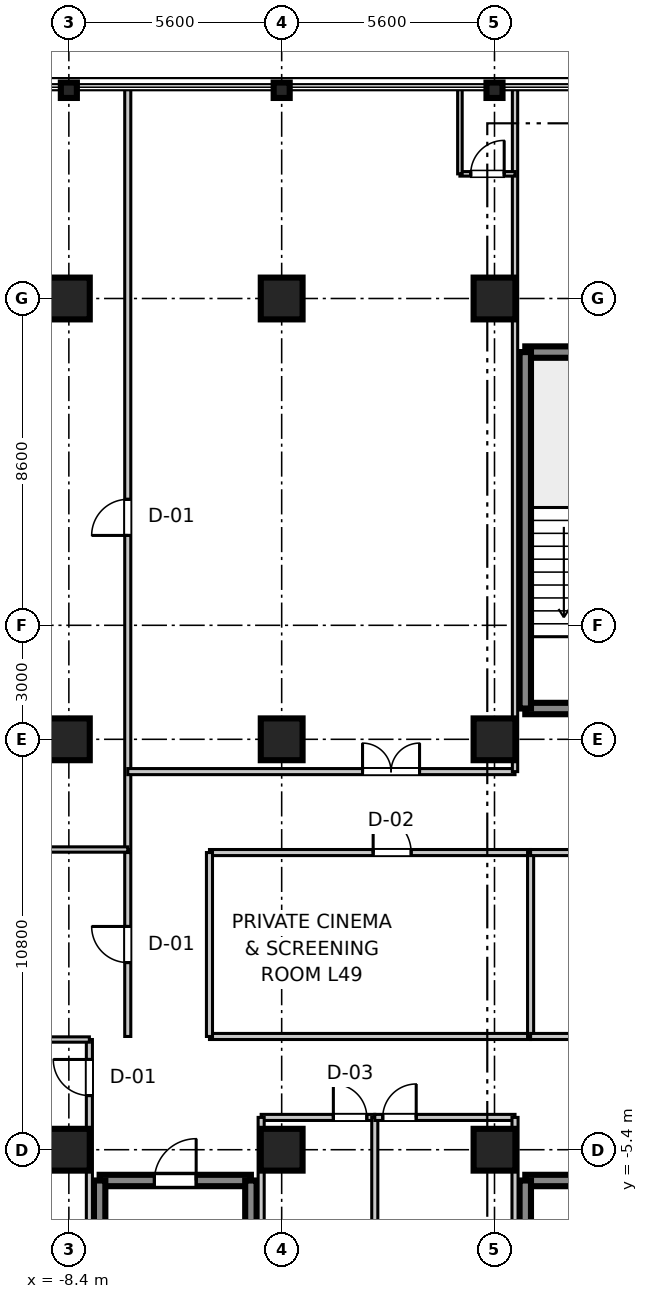
"""IFC4 building model, lengths in metres.
Left out: names, types, materials, properties, quantities, classifications, styles, units other than length and angle.
Written with IfcOpenShell. Run it as: python <this file> out.ifc"""

import sys

from ifc_helpers import new_model, si_unit, direction, frame, frame_2d, origin, origin_2d, place, context, subcontext, project, spatial, rectangle, i_section, extrude, source, transform, mapped, element, fill, save


model = new_model("IFC4")
c1 = context("Model", 3, precision=1e-05, world=origin(), true_north=direction((0.0, 1.0)))
c2 = subcontext(c1, "Body", "Model", "MODEL_VIEW")
j1 = project(units=[si_unit("LENGTHUNIT", "METRE"), si_unit("PLANEANGLEUNIT", "RADIAN")], contexts=[c1])
p1 = place(None, origin())
s1 = spatial("IfcSite", under=j1, at=p1, CompositionType="ELEMENT")
p2 = place(p1, origin())
s2 = spatial("IfcBuilding", under=s1, at=p2, CompositionType="ELEMENT")
p3 = place(p2, frame((0.0, 0.0, 192.8)))
s3 = spatial("IfcBuildingStorey", under=s2, at=p3, CompositionType="ELEMENT", Elevation=192.8)
m1 = source(origin(), c2, "Body", "SweptSolid", [
    extrude(rectangle(XDim=1.1, YDim=1.1, at=origin_2d()), origin(), (0.0, 0.0, 1.0), 3.605),
])
for number, where, z_axis, x_axis in (
    (1, (-8.4, -5.4, 0.0), (0.0, 0.0, 1.0), (1.0, 0.0, 0.0)),
    (2, (-8.4, 5.4, 0.0), (0.0, 0.0, 1.0), (1.0, 0.0, 0.0)),
    (3, (-8.4, 17.0, 0.0), (0.0, 0.0, 1.0), (1.0, 0.0, 0.0)),
    (4, (-2.8, -5.4, 0.0), (0.0, 0.0, 1.0), (1.0, 0.0, 0.0)),
    (5, (-2.8, 5.4, 0.0), (0.0, 0.0, 1.0), (1.0, 0.0, 0.0)),
    (6, (-2.8, 17.0, 0.0), (0.0, 0.0, 1.0), (1.0, 0.0, 0.0)),
    (7, (2.8, -5.4, 0.0), (0.0, 0.0, 1.0), (1.0, 0.0, 0.0)),
    (8, (2.8, 5.4, 0.0), (0.0, 0.0, 1.0), (1.0, 0.0, 0.0)),
    (9, (2.8, 17.0, 0.0), (0.0, 0.0, 1.0), (1.0, 0.0, 0.0)),
):
    element("IfcColumn", number, at=place(p3, frame(where, z_axis=z_axis, x_axis=x_axis)), inside=s3, PredefinedType="COLUMN", context=c2, shape_type="MappedRepresentation", body=[
        mapped(m1, transform((0.0, 0.0, 0.0), scale=1.0)),
    ])
m2 = source(origin(), c2, "Body", "SweptSolid", [
    extrude(i_section(OverallWidth=0.406, OverallDepth=0.422, WebThickness=0.019, FlangeThickness=0.03, at=origin_2d()), origin(), (0.0, 0.0, 1.0), 3.605),
])
for number, where, z_axis, x_axis in (
    (10, (-8.4, 22.48, 0.0), (0.0, 0.0, 1.0), (0.0, 1.0, 0.0)),
    (11, (-2.8, 22.48, 0.0), (0.0, 0.0, 1.0), (0.0, 1.0, 0.0)),
    (12, (2.8, 22.48, 0.0), (0.0, 0.0, 1.0), (0.0, 1.0, 0.0)),
):
    element("IfcColumn", number, at=place(p3, frame(where, z_axis=z_axis, x_axis=x_axis)), inside=s3, PredefinedType="COLUMN", context=c2, shape_type="MappedRepresentation", body=[
        mapped(m2, transform((0.0, 0.0, 0.0), scale=1.0)),
    ])
m3 = source(origin(), c2, "Body", "SweptSolid", [
    extrude(rectangle(XDim=3.98, YDim=0.3, at=frame_2d((1.99, 0.0))), origin(), (0.0, 0.0, 1.0), 3.39),
])
for number, where, z_axis, x_axis in (
    (13, (3.61, 6.21, 0.0), (0.0, 0.0, 1.0), (1.0, 0.0, 0.0)),
    (14, (3.61, 15.59, 0.0), (0.0, 0.0, 1.0), (1.0, 0.0, 0.0)),
):
    element("IfcWall", number, at=place(p3, frame(where, z_axis=z_axis, x_axis=x_axis)), inside=s3, PredefinedType="SHEAR", context=c2, shape_type="MappedRepresentation", body=[
        mapped(m3, transform((0.0, 0.0, 0.0), scale=1.0)),
    ])
m4 = source(origin(), c2, "Body", "SweptSolid", [
    extrude(rectangle(XDim=9.38, YDim=0.3, at=frame_2d((4.69, 0.0))), origin(), (0.0, 0.0, 1.0), 3.39),
])
p4 = place(p3, frame((3.61, 6.21, 0.0), z_axis=(0.0, 0.0, 1.0), x_axis=(0.0, 1.0, 0.0)))
e15 = element("IfcWall", 15, at=p4, inside=s3, PredefinedType="SHEAR", context=c2, shape_type="MappedRepresentation", body=[
    mapped(m4, transform((0.0, 0.0, 0.0), scale=1.0)),
])
p5 = place(p3, frame((3.61, -6.21, 0.0), z_axis=(0.0, 0.0, 1.0), x_axis=(1.0, 0.0, 0.0)))
e16 = element("IfcWall", 16, at=p5, inside=s3, PredefinedType="SHEAR", context=c2, shape_type="MappedRepresentation", body=[
    mapped(m3, transform((0.0, 0.0, 0.0), scale=1.0)),
])
p6 = place(p3, frame((3.61, -15.59, 0.0), z_axis=(0.0, 0.0, 1.0), x_axis=(0.0, 1.0, 0.0)))
e17 = element("IfcWall", 17, at=p6, inside=s3, PredefinedType="SHEAR", context=c2, shape_type="MappedRepresentation", body=[
    mapped(m4, transform((0.0, 0.0, 0.0), scale=1.0)),
])
p7 = place(p3, frame((-7.59, -6.21, 0.0), z_axis=(0.0, 0.0, 1.0), x_axis=(1.0, 0.0, 0.0)))
e18 = element("IfcWall", 18, at=p7, inside=s3, PredefinedType="SHEAR", context=c2, shape_type="MappedRepresentation", body=[
    mapped(m3, transform((0.0, 0.0, 0.0), scale=1.0)),
])
p8 = place(p7, frame((1.44, 0.0, 0.0)))
e19 = element("IfcOpeningElement", 19, at=p8, cuts=e18, PredefinedType="OPENING", context=c2, shape_type="SweptSolid", body=[
    extrude(rectangle(XDim=1.1, YDim=2.15, at=frame_2d((0.55, 1.075))), frame((0.0, 0.16, 0.0), z_axis=(0.0, -1.0, 0.0), x_axis=(1.0, 0.0, 0.0)), (0.0, 0.0, 1.0), 0.32),
])
for number, where, z_axis, x_axis in (
    (20, (-7.59, -15.59, 0.0), (0.0, 0.0, 1.0), (0.0, 1.0, 0.0)),
    (21, (-3.61, -15.59, 0.0), (0.0, 0.0, 1.0), (0.0, 1.0, 0.0)),
):
    element("IfcWall", number, at=place(p3, frame(where, z_axis=z_axis, x_axis=x_axis)), inside=s3, PredefinedType="SHEAR", context=c2, shape_type="MappedRepresentation", body=[
        mapped(m4, transform((0.0, 0.0, 0.0), scale=1.0)),
    ])
m5 = source(origin(), c2, "Body", "SweptSolid", [
    extrude(rectangle(XDim=20.0, YDim=0.16, at=frame_2d((10.0, 0.0))), origin(), (0.0, 0.0, 1.0), 2.73),
])
p9 = place(p3, frame((-6.85, 2.5, 0.0), z_axis=(0.0, 0.0, 1.0), x_axis=(0.0, 1.0, 0.0)))
e22 = element("IfcWall", 22, at=p9, inside=s3, PredefinedType="PARTITIONING", context=c2, shape_type="MappedRepresentation", body=[
    mapped(m5, transform((0.0, 0.0, 0.0), scale=1.0)),
])
p10 = place(p9, frame((8.265, 0.0, 0.0)))
e23 = element("IfcOpeningElement", 23, at=p10, cuts=e22, PredefinedType="OPENING", context=c2, shape_type="SweptSolid", body=[
    extrude(rectangle(XDim=0.95, YDim=2.1, at=frame_2d((0.475, 1.05))), frame((0.0, 0.09, 0.0), z_axis=(0.0, -1.0, 0.0), x_axis=(1.0, 0.0, 0.0)), (0.0, 0.0, 1.0), 0.18),
])
m6 = source(origin(), c2, "Body", "SweptSolid", [
    extrude(rectangle(XDim=12.91, YDim=0.14, at=frame_2d((6.455, 0.0))), origin(), (0.0, 0.0, 1.0), 2.73),
])
p11 = place(p3, frame((-19.76, 2.5, 0.0), z_axis=(0.0, 0.0, 1.0), x_axis=(1.0, 0.0, 0.0)))
e24 = element("IfcWall", 24, at=p11, inside=s3, PredefinedType="PARTITIONING", context=c2, shape_type="MappedRepresentation", body=[
    mapped(m6, transform((0.0, 0.0, 0.0), scale=1.0)),
])
m7 = source(origin(), c2, "Body", "SweptSolid", [
    extrude(rectangle(XDim=10.19, YDim=0.16, at=frame_2d((5.095, 0.0))), origin(), (0.0, 0.0, 1.0), 2.73),
])
p12 = place(p3, frame((-6.85, 4.55, 0.0), z_axis=(0.0, 0.0, 1.0), x_axis=(1.0, 0.0, 0.0)))
e25 = element("IfcWall", 25, at=p12, inside=s3, PredefinedType="PARTITIONING", context=c2, shape_type="MappedRepresentation", body=[
    mapped(m7, transform((0.0, 0.0, 0.0), scale=1.0)),
])
p13 = place(p12, frame((6.178, 0.0, 0.0)))
e26 = element("IfcOpeningElement", 26, at=p13, cuts=e25, PredefinedType="OPENING", context=c2, shape_type="SweptSolid", body=[
    extrude(rectangle(XDim=1.5, YDim=2.15, at=frame_2d((0.75, 1.075))), frame((0.0, 0.09, 0.0), z_axis=(0.0, -1.0, 0.0), x_axis=(1.0, 0.0, 0.0)), (0.0, 0.0, 1.0), 0.18),
])
m8 = source(origin(), c2, "Body", "SweptSolid", [
    extrude(rectangle(XDim=17.95, YDim=0.14, at=frame_2d((8.975, 0.0))), origin(), (0.0, 0.0, 1.0), 2.73),
])
p14 = place(p3, frame((3.34, 4.55, 0.0), z_axis=(0.0, 0.0, 1.0), x_axis=(0.0, 1.0, 0.0)))
e27 = element("IfcWall", 27, at=p14, inside=s3, PredefinedType="PARTITIONING", context=c2, shape_type="MappedRepresentation", body=[
    mapped(m8, transform((0.0, 0.0, 0.0), scale=1.0)),
])
m9 = source(origin(), c2, "Body", "SweptSolid", [
    extrude(rectangle(XDim=1.45, YDim=0.12, at=frame_2d((0.725, 0.0))), origin(), (0.0, 0.0, 1.0), 2.73),
])
p15 = place(p3, frame((1.89, 20.28, 0.0), z_axis=(0.0, 0.0, 1.0), x_axis=(1.0, 0.0, 0.0)))
e28 = element("IfcWall", 28, at=p15, inside=s3, PredefinedType="PARTITIONING", context=c2, shape_type="MappedRepresentation", body=[
    mapped(m9, transform((0.0, 0.0, 0.0), scale=1.0)),
])
p16 = place(p15, frame((0.285, 0.0, 0.0)))
e29 = element("IfcOpeningElement", 29, at=p16, cuts=e28, PredefinedType="OPENING", context=c2, shape_type="SweptSolid", body=[
    extrude(rectangle(XDim=0.88, YDim=2.1, at=frame_2d((0.44, 1.05))), frame((0.0, 0.07, 0.0), z_axis=(0.0, -1.0, 0.0), x_axis=(1.0, 0.0, 0.0)), (0.0, 0.0, 1.0), 0.14),
])
m10 = source(origin(), c2, "Body", "SweptSolid", [
    extrude(rectangle(XDim=2.22, YDim=0.12, at=frame_2d((1.11, 0.0))), origin(), (0.0, 0.0, 1.0), 2.73),
])
p17 = place(p3, frame((1.89, 20.28, 0.0), z_axis=(0.0, 0.0, 1.0), x_axis=(0.0, 1.0, 0.0)))
e30 = element("IfcWall", 30, at=p17, inside=s3, PredefinedType="PARTITIONING", context=c2, shape_type="MappedRepresentation", body=[
    mapped(m10, transform((0.0, 0.0, 0.0), scale=1.0)),
])
p18 = place(p3, frame((-7.86, -22.5, 0.0), z_axis=(0.0, 0.0, 1.0), x_axis=(0.0, 1.0, 0.0)))
e31 = element("IfcWall", 31, at=p18, inside=s3, PredefinedType="PARTITIONING", context=c2, shape_type="MappedRepresentation", body=[
    mapped(m5, transform((0.0, 0.0, 0.0), scale=1.0)),
])
p19 = place(p18, frame((18.525, 0.0, 0.0)))
e32 = element("IfcOpeningElement", 32, at=p19, cuts=e31, PredefinedType="OPENING", context=c2, shape_type="SweptSolid", body=[
    extrude(rectangle(XDim=0.95, YDim=2.1, at=frame_2d((0.475, 1.05))), frame((0.0, 0.09, 0.0), z_axis=(0.0, -1.0, 0.0), x_axis=(1.0, 0.0, 0.0)), (0.0, 0.0, 1.0), 0.18),
])
m11 = source(origin(), c2, "Body", "SweptSolid", [
    extrude(rectangle(XDim=11.9, YDim=0.14, at=frame_2d((5.95, 0.0))), origin(), (0.0, 0.0, 1.0), 2.73),
])
p20 = place(p3, frame((-19.76, -2.5, 0.0), z_axis=(0.0, 0.0, 1.0), x_axis=(1.0, 0.0, 0.0)))
e33 = element("IfcWall", 33, at=p20, inside=s3, PredefinedType="PARTITIONING", context=c2, shape_type="MappedRepresentation", body=[
    mapped(m11, transform((0.0, 0.0, 0.0), scale=1.0)),
])
m12 = source(origin(), c2, "Body", "SweptSolid", [
    extrude(rectangle(XDim=2.99, YDim=0.16, at=frame_2d((1.495, 0.0))), origin(), (0.0, 0.0, 1.0), 2.73),
])
p21 = place(p3, frame((-3.34, -4.55, 0.0), z_axis=(0.0, 0.0, 1.0), x_axis=(1.0, 0.0, 0.0)))
e34 = element("IfcWall", 34, at=p21, inside=s3, PredefinedType="PARTITIONING", context=c2, shape_type="MappedRepresentation", body=[
    mapped(m12, transform((0.0, 0.0, 0.0), scale=1.0)),
])
p22 = place(p21, frame((1.9, 0.0, 0.0)))
e35 = element("IfcOpeningElement", 35, at=p22, cuts=e34, PredefinedType="OPENING", context=c2, shape_type="SweptSolid", body=[
    extrude(rectangle(XDim=0.88, YDim=2.1, at=frame_2d((0.44, 1.05))), frame((0.0, 0.09, 0.0), z_axis=(0.0, -1.0, 0.0), x_axis=(1.0, 0.0, 0.0)), (0.0, 0.0, 1.0), 0.18),
])
m13 = source(origin(), c2, "Body", "SweptSolid", [
    extrude(rectangle(XDim=17.95, YDim=0.16, at=frame_2d((8.975, 0.0))), origin(), (0.0, 0.0, 1.0), 2.73),
])
for number, where, z_axis, x_axis in (
    (36, (-3.34, -22.5, 0.0), (0.0, 0.0, 1.0), (0.0, 1.0, 0.0)),
    (37, (-0.35, -22.5, 0.0), (0.0, 0.0, 1.0), (0.0, 1.0, 0.0)),
):
    element("IfcWall", number, at=place(p3, frame(where, z_axis=z_axis, x_axis=x_axis)), inside=s3, PredefinedType="PARTITIONING", context=c2, shape_type="MappedRepresentation", body=[
        mapped(m13, transform((0.0, 0.0, 0.0), scale=1.0)),
    ])
m14 = source(origin(), c2, "Body", "SweptSolid", [
    extrude(rectangle(XDim=3.69, YDim=0.16, at=frame_2d((1.845, 0.0))), origin(), (0.0, 0.0, 1.0), 2.73),
])
p23 = place(p3, frame((-0.35, -4.55, 0.0), z_axis=(0.0, 0.0, 1.0), x_axis=(1.0, 0.0, 0.0)))
e38 = element("IfcWall", 38, at=p23, inside=s3, PredefinedType="PARTITIONING", context=c2, shape_type="MappedRepresentation", body=[
    mapped(m14, transform((0.0, 0.0, 0.0), scale=1.0)),
])
p24 = place(p23, frame((0.21, 0.0, 0.0)))
e39 = element("IfcOpeningElement", 39, at=p24, cuts=e38, PredefinedType="OPENING", context=c2, shape_type="SweptSolid", body=[
    extrude(rectangle(XDim=0.88, YDim=2.1, at=frame_2d((0.44, 1.05))), frame((0.0, 0.09, 0.0), z_axis=(0.0, -1.0, 0.0), x_axis=(1.0, 0.0, 0.0)), (0.0, 0.0, 1.0), 0.18),
])
p25 = place(p3, frame((3.34, -22.5, 0.0), z_axis=(0.0, 0.0, 1.0), x_axis=(0.0, 1.0, 0.0)))
e40 = element("IfcWall", 40, at=p25, inside=s3, PredefinedType="PARTITIONING", context=c2, shape_type="MappedRepresentation", body=[
    mapped(m13, transform((0.0, 0.0, 0.0), scale=1.0)),
])
m15 = source(origin(), c2, "Body", "SweptSolid", [
    extrude(rectangle(XDim=4.84, YDim=0.16, at=frame_2d((2.42, 0.0))), origin(), (0.0, 0.0, 1.0), 2.73),
])
p26 = place(p3, frame((-6.85, -2.42, 0.0), z_axis=(0.0, 0.0, 1.0), x_axis=(0.0, 1.0, 0.0)))
e41 = element("IfcWall", 41, at=p26, inside=s3, PredefinedType="PARTITIONING", context=c2, shape_type="MappedRepresentation", body=[
    mapped(m15, transform((0.0, 0.0, 0.0), scale=1.0)),
])
p27 = place(p26, frame((1.945, 0.0, 0.0)))
e42 = element("IfcOpeningElement", 42, at=p27, cuts=e41, PredefinedType="OPENING", context=c2, shape_type="SweptSolid", body=[
    extrude(rectangle(XDim=0.95, YDim=2.1, at=frame_2d((0.475, 1.05))), frame((0.0, 0.09, 0.0), z_axis=(0.0, -1.0, 0.0), x_axis=(1.0, 0.0, 0.0)), (0.0, 0.0, 1.0), 0.18),
])
m16 = source(origin(), c2, "Body", "SweptSolid", [
    extrude(rectangle(XDim=8.45, YDim=0.16, at=frame_2d((4.225, 0.0))), origin(), (0.0, 0.0, 1.0), 2.73),
])
p28 = place(p3, frame((-4.7, -2.42, 0.0), z_axis=(0.0, 0.0, 1.0), x_axis=(1.0, 0.0, 0.0)))
e43 = element("IfcWall", 43, at=p28, inside=s3, PredefinedType="PARTITIONING", context=c2, shape_type="MappedRepresentation", body=[
    mapped(m16, transform((0.0, 0.0, 0.0), scale=1.0)),
])
p29 = place(p3, frame((-4.7, 2.42, 0.0), z_axis=(0.0, 0.0, 1.0), x_axis=(1.0, 0.0, 0.0)))
e44 = element("IfcWall", 44, at=p29, inside=s3, PredefinedType="PARTITIONING", context=c2, shape_type="MappedRepresentation", body=[
    mapped(m16, transform((0.0, 0.0, 0.0), scale=1.0)),
])
p30 = place(p29, frame((4.307, 0.0, 0.0)))
e45 = element("IfcOpeningElement", 45, at=p30, cuts=e44, PredefinedType="OPENING", context=c2, shape_type="SweptSolid", body=[
    extrude(rectangle(XDim=1.0, YDim=2.1, at=frame_2d((0.5, 1.05))), frame((0.0, 0.09, 0.0), z_axis=(0.0, -1.0, 0.0), x_axis=(1.0, 0.0, 0.0)), (0.0, 0.0, 1.0), 0.18),
])
for number, where, z_axis, x_axis in (
    (46, (-4.7, -2.42, 0.0), (0.0, 0.0, 1.0), (0.0, 1.0, 0.0)),
    (47, (3.75, -2.42, 0.0), (0.0, 0.0, 1.0), (0.0, 1.0, 0.0)),
):
    element("IfcWall", number, at=place(p3, frame(where, z_axis=z_axis, x_axis=x_axis)), inside=s3, PredefinedType="PARTITIONING", context=c2, shape_type="MappedRepresentation", body=[
        mapped(m15, transform((0.0, 0.0, 0.0), scale=1.0)),
    ])
m17 = source(origin(), c2, "Body", "SweptSolid", [
    extrude(rectangle(XDim=3.6, YDim=0.16, at=frame_2d((1.8, 0.0))), origin(), (0.0, 0.0, 1.0), 2.73),
])
p31 = place(p3, frame((3.75, -2.42, 0.0), z_axis=(0.0, 0.0, 1.0), x_axis=(1.0, 0.0, 0.0)))
e48 = element("IfcWall", 48, at=p31, inside=s3, PredefinedType="PARTITIONING", context=c2, shape_type="MappedRepresentation", body=[
    mapped(m17, transform((0.0, 0.0, 0.0), scale=1.0)),
])
p32 = place(p31, frame((1.38, 0.0, 0.0)))
e49 = element("IfcOpeningElement", 49, at=p32, cuts=e48, PredefinedType="OPENING", context=c2, shape_type="SweptSolid", body=[
    extrude(rectangle(XDim=1.0, YDim=2.1, at=frame_2d((0.5, 1.05))), frame((0.0, 0.09, 0.0), z_axis=(0.0, -1.0, 0.0), x_axis=(1.0, 0.0, 0.0)), (0.0, 0.0, 1.0), 0.18),
])
p33 = place(p3, frame((3.75, 2.42, 0.0), z_axis=(0.0, 0.0, 1.0), x_axis=(1.0, 0.0, 0.0)))
e50 = element("IfcWall", 50, at=p33, inside=s3, PredefinedType="PARTITIONING", context=c2, shape_type="MappedRepresentation", body=[
    mapped(m17, transform((0.0, 0.0, 0.0), scale=1.0)),
])
m18 = source(origin(), c2, "Body", "SweptSolid", [
    extrude(rectangle(XDim=1.1, YDim=2.15, at=frame_2d((0.55, 1.075))), frame((0.0, 0.025, 0.0), z_axis=(0.0, -1.0, 0.0), x_axis=(1.0, 0.0, 0.0)), (0.0, 0.0, 1.0), 0.05),
])
p34 = place(p8, frame((1.1, 0.0, 0.0), z_axis=(0.0, 0.0, 1.0), x_axis=(-1.0, 0.0, 0.0)))
e51 = element("IfcDoor", 51, at=p34, inside=s3, OperationType="SINGLE_SWING_RIGHT", PredefinedType="DOOR", context=c2, shape_type="MappedRepresentation", body=[
    mapped(m18, transform((0.0, 0.0, 0.0), scale=1.0)),
])
fill(e19, e51)
m19 = source(origin(), c2, "Body", "SweptSolid", [
    extrude(rectangle(XDim=0.95, YDim=2.1, at=frame_2d((0.475, 1.05))), frame((0.0, 0.025, 0.0), z_axis=(0.0, -1.0, 0.0), x_axis=(1.0, 0.0, 0.0)), (0.0, 0.0, 1.0), 0.05),
])
p35 = place(p10, origin())
e52 = element("IfcDoor", 52, at=p35, inside=s3, OperationType="SINGLE_SWING_LEFT", PredefinedType="DOOR", context=c2, shape_type="MappedRepresentation", body=[
    mapped(m19, transform((0.0, 0.0, 0.0), scale=1.0)),
])
fill(e23, e52)
m20 = source(origin(), c2, "Body", "SweptSolid", [
    extrude(rectangle(XDim=0.88, YDim=2.1, at=frame_2d((0.44, 1.05))), frame((0.0, 0.025, 0.0), z_axis=(0.0, -1.0, 0.0), x_axis=(1.0, 0.0, 0.0)), (0.0, 0.0, 1.0), 0.05),
])
p36 = place(p16, origin())
e53 = element("IfcDoor", 53, at=p36, inside=s3, OperationType="SINGLE_SWING_RIGHT", PredefinedType="DOOR", context=c2, shape_type="MappedRepresentation", body=[
    mapped(m20, transform((0.0, 0.0, 0.0), scale=1.0)),
])
fill(e29, e53)
m21 = source(origin(), c2, "Body", "SweptSolid", [
    extrude(rectangle(XDim=1.5, YDim=2.15, at=frame_2d((0.75, 1.075))), frame((0.0, 0.025, 0.0), z_axis=(0.0, -1.0, 0.0), x_axis=(1.0, 0.0, 0.0)), (0.0, 0.0, 1.0), 0.05),
])
p37 = place(p13, origin())
e54 = element("IfcDoor", 54, at=p37, inside=s3, OperationType="DOUBLE_DOOR_SINGLE_SWING", PredefinedType="DOOR", context=c2, shape_type="MappedRepresentation", body=[
    mapped(m21, transform((0.0, 0.0, 0.0), scale=1.0)),
])
fill(e26, e54)
p38 = place(p19, origin())
e55 = element("IfcDoor", 55, at=p38, inside=s3, OperationType="SINGLE_SWING_RIGHT", PredefinedType="DOOR", context=c2, shape_type="MappedRepresentation", body=[
    mapped(m19, transform((0.0, 0.0, 0.0), scale=1.0)),
])
fill(e32, e55)
p39 = place(p22, frame((0.88, 0.0, 0.0), z_axis=(0.0, 0.0, 1.0), x_axis=(-1.0, 0.0, 0.0)))
e56 = element("IfcDoor", 56, at=p39, inside=s3, OperationType="SINGLE_SWING_LEFT", PredefinedType="DOOR", context=c2, shape_type="MappedRepresentation", body=[
    mapped(m20, transform((0.0, 0.0, 0.0), scale=1.0)),
])
fill(e35, e56)
p40 = place(p24, frame((0.88, 0.0, 0.0), z_axis=(0.0, 0.0, 1.0), x_axis=(-1.0, 0.0, 0.0)))
e57 = element("IfcDoor", 57, at=p40, inside=s3, OperationType="SINGLE_SWING_RIGHT", PredefinedType="DOOR", context=c2, shape_type="MappedRepresentation", body=[
    mapped(m20, transform((0.0, 0.0, 0.0), scale=1.0)),
])
fill(e39, e57)
p41 = place(p27, origin())
e58 = element("IfcDoor", 58, at=p41, inside=s3, OperationType="SINGLE_SWING_RIGHT", PredefinedType="DOOR", context=c2, shape_type="MappedRepresentation", body=[
    mapped(m19, transform((0.0, 0.0, 0.0), scale=1.0)),
])
fill(e42, e58)
m22 = source(origin(), c2, "Body", "SweptSolid", [
    extrude(rectangle(XDim=1.0, YDim=2.1, at=frame_2d((0.5, 1.05))), frame((0.0, 0.025, 0.0), z_axis=(0.0, -1.0, 0.0), x_axis=(1.0, 0.0, 0.0)), (0.0, 0.0, 1.0), 0.05),
])
p42 = place(p30, frame((1.0, 0.0, 0.0), z_axis=(0.0, 0.0, 1.0), x_axis=(-1.0, 0.0, 0.0)))
e59 = element("IfcDoor", 59, at=p42, inside=s3, OperationType="SINGLE_SWING_LEFT", PredefinedType="DOOR", context=c2, shape_type="MappedRepresentation", body=[
    mapped(m22, transform((0.0, 0.0, 0.0), scale=1.0)),
])
fill(e45, e59)
save(model, sys.argv[1])
